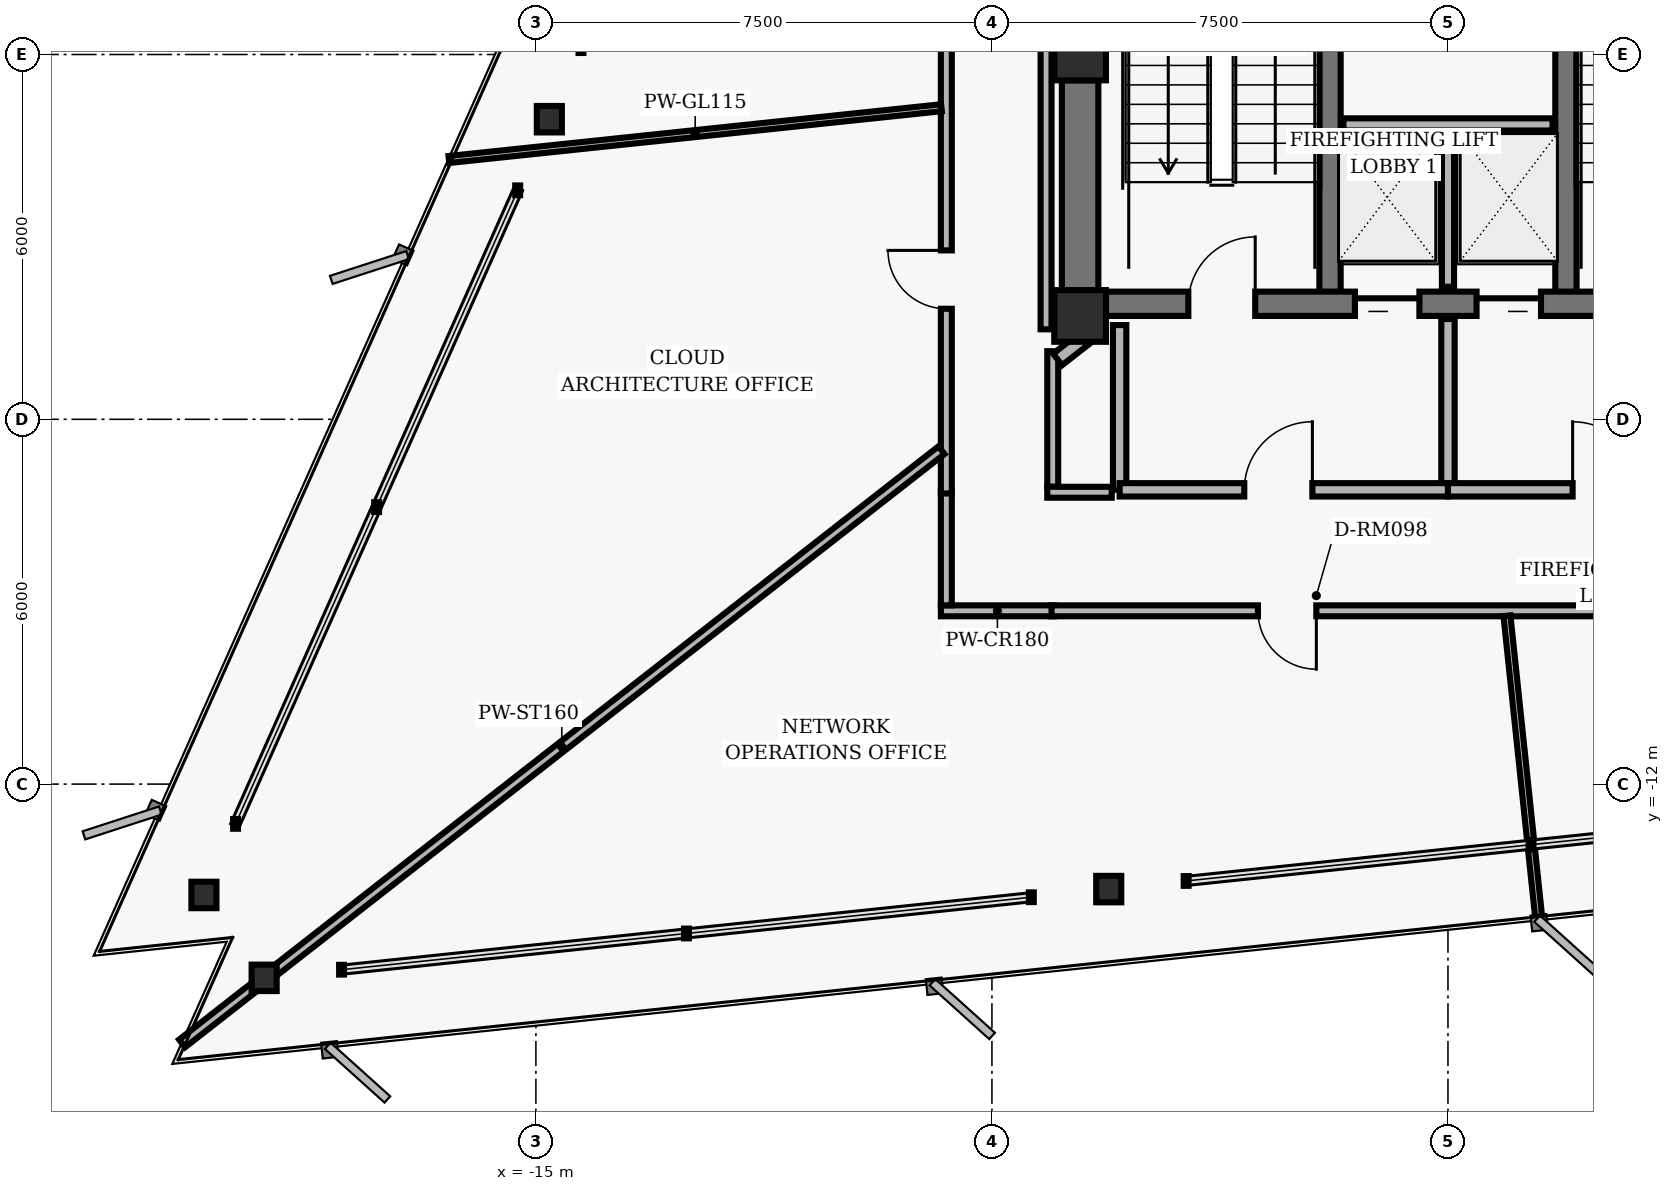
"""IFC4 building model, lengths in metres.
Left out: names, types, materials, properties, quantities, classifications, styles, units other than length and angle.
Written with IfcOpenShell. Run it as: python <this file> out.ifc"""

import sys

from ifc_helpers import new_model, si_unit, direction, frame, frame_2d, origin, origin_2d, place, context, subcontext, project, spatial, rectangle, hollow_rectangle, i_section, extrude, element, fill, save


model = new_model("IFC4")
c1 = context("Model", 3, precision=1e-05, world=origin(), true_north=direction((0.0, 1.0)))
c2 = subcontext(c1, "Body", "Model", "MODEL_VIEW")
j1 = project(units=[si_unit("LENGTHUNIT", "METRE"), si_unit("PLANEANGLEUNIT", "RADIAN")], contexts=[c1])
p1 = place(None, origin())
s1 = spatial("IfcSite", under=j1, at=p1, CompositionType="ELEMENT")
p2 = place(p1, origin())
s2 = spatial("IfcBuilding", under=s1, at=p2, CompositionType="ELEMENT")
p3 = place(p2, frame((0.0, 0.0, 104.64)))
s3 = spatial("IfcBuildingStorey", under=s2, at=p3, CompositionType="ELEMENT", Elevation=104.64)
for number, where, z_axis, x_axis in (
    (1, (-6.05, 0.0, 0.0), (0.0, 0.0, 1.0), (1.0, 0.0, 0.0)),
    (2, (-6.05, -4.3, 0.0), (0.0, 0.0, 1.0), (1.0, 0.0, 0.0)),
):
    element("IfcColumn", number, at=place(p3, frame(where, z_axis=z_axis, x_axis=x_axis)), inside=s3, PredefinedType="COLUMN", context=c2, shape_type="SweptSolid", body=[
        extrude(hollow_rectangle(XDim=0.85, YDim=0.85, WallThickness=0.055, InnerFilletRadius=0.02, OuterFilletRadius=0.04, at=origin_2d()), origin(), (0.0, 0.0, 1.0), 3.04),
    ])
p4 = place(p3, frame((-6.05, -3.875, 0.0), z_axis=(0.0, 0.0, 1.0), x_axis=(0.0, 1.0, 0.0)))
e3 = element("IfcWall", 3, at=p4, inside=s3, PredefinedType="SHEAR", context=c2, shape_type="SweptSolid", body=[
    extrude(rectangle(XDim=3.45, YDim=0.6, at=frame_2d((1.725, 0.0))), origin(), (0.0, 0.0, 1.0), 2.788),
])
for number, where, z_axis, x_axis in (
    (4, (-1.94, -4.1, 0.0), (0.0, 0.0, 1.0), (0.0, 1.0, 0.0)),
    (5, (1.94, -4.1, 0.0), (0.0, 0.0, 1.0), (0.0, 1.0, 0.0)),
):
    element("IfcWall", number, at=place(p3, frame(where, z_axis=z_axis, x_axis=x_axis)), inside=s3, PredefinedType="SHEAR", context=c2, shape_type="SweptSolid", body=[
        extrude(rectangle(XDim=8.2, YDim=0.35, at=frame_2d((4.1, 0.0))), origin(), (0.0, 0.0, 1.0), 2.788),
    ])
p5 = place(p3, frame((-5.625, -4.1, 0.0), z_axis=(0.0, 0.0, 1.0), x_axis=(1.0, 0.0, 0.0)))
e6 = element("IfcWall", 6, at=p5, inside=s3, PredefinedType="SHEAR", context=c2, shape_type="SweptSolid", body=[
    extrude(rectangle(XDim=11.25, YDim=0.4, at=frame_2d((5.625, 0.0))), origin(), (0.0, 0.0, 1.0), 2.788),
])
p6 = place(p5, frame((1.355, 0.0, 0.0)))
e7 = element("IfcOpeningElement", 7, at=p6, cuts=e6, PredefinedType="OPENING", context=c2, shape_type="SweptSolid", body=[
    extrude(rectangle(XDim=1.1, YDim=2.04, at=frame_2d((0.55, 1.02))), frame((0.0, 0.21, 0.0), z_axis=(0.0, -1.0, 0.0), x_axis=(1.0, 0.0, 0.0)), (0.0, 0.0, 1.0), 0.42),
])
p7 = place(p5, frame((8.795, 0.0, 0.0)))
e8 = element("IfcOpeningElement", 8, at=p7, cuts=e6, PredefinedType="OPENING", context=c2, shape_type="SweptSolid", body=[
    extrude(rectangle(XDim=1.1, YDim=2.04, at=frame_2d((0.55, 1.02))), frame((0.0, 0.21, 0.0), z_axis=(0.0, -1.0, 0.0), x_axis=(1.0, 0.0, 0.0)), (0.0, 0.0, 1.0), 0.42),
])
p8 = place(p5, frame((4.095, 0.0, 0.0)))
e9 = element("IfcOpeningElement", 9, at=p8, cuts=e6, PredefinedType="OPENING", context=c2, shape_type="SweptSolid", body=[
    extrude(rectangle(XDim=1.06, YDim=2.04, at=frame_2d((0.53, 1.02))), frame((0.0, 0.21, 0.0), z_axis=(0.0, -1.0, 0.0), x_axis=(1.0, 0.0, 0.0)), (0.0, 0.0, 1.0), 0.42),
])
p9 = place(p5, frame((6.095, 0.0, 0.0)))
e10 = element("IfcOpeningElement", 10, at=p9, cuts=e6, PredefinedType="OPENING", context=c2, shape_type="SweptSolid", body=[
    extrude(rectangle(XDim=1.06, YDim=2.04, at=frame_2d((0.53, 1.02))), frame((0.0, 0.21, 0.0), z_axis=(0.0, -1.0, 0.0), x_axis=(1.0, 0.0, 0.0)), (0.0, 0.0, 1.0), 0.42),
])
for number, where, z_axis, x_axis in (
    (11, (-14.779, -1.064, 0.0), (0.0, 0.0, 1.0), (1.0, 0.0, 0.0)),
    (12, (-20.46, -13.823, 0.0), (0.0, 0.0, 1.0), (1.0, 0.0, 0.0)),
    (13, (-19.469, -15.187, 0.0), (0.0, 0.0, 1.0), (1.0, 0.0, 0.0)),
    (14, (-5.579, -13.727, 0.0), (0.0, 0.0, 1.0), (1.0, 0.0, 0.0)),
):
    element("IfcColumn", number, at=place(p3, frame(where, z_axis=z_axis, x_axis=x_axis)), inside=s3, PredefinedType="COLUMN", context=c2, shape_type="SweptSolid", body=[
        extrude(i_section(OverallWidth=0.412, OverallDepth=0.435, WebThickness=0.036, FlangeThickness=0.057, FilletRadius=0.022, at=origin_2d()), origin(), (0.0, 0.0, 1.0), 3.04),
    ])
p10 = place(p3, frame((0.0, -3.82, 0.0), z_axis=(0.0, 0.0, 1.0), x_axis=(0.0, 1.0, 0.0)))
e15 = element("IfcWall", 15, at=p10, inside=s3, PredefinedType="PARTITIONING", context=c2, shape_type="SweptSolid", body=[
    extrude(rectangle(XDim=2.67, YDim=0.2, at=frame_2d((1.335, 0.0))), origin(), (0.0, 0.0, 1.0), 2.763),
])
p11 = place(p3, frame((-1.72, -1.15, 0.0), z_axis=(0.0, 0.0, 1.0), x_axis=(1.0, 0.0, 0.0)))
e16 = element("IfcWall", 16, at=p11, inside=s3, PredefinedType="PARTITIONING", context=c2, shape_type="SweptSolid", body=[
    extrude(rectangle(XDim=3.44, YDim=0.2, at=frame_2d((1.72, 0.0))), origin(), (0.0, 0.0, 1.0), 2.763),
])
p12 = place(p3, frame((-5.4, -7.16, 0.0), z_axis=(0.0, 0.0, 1.0), x_axis=(0.0, 1.0, 0.0)))
e17 = element("IfcWall", 17, at=p12, inside=s3, PredefinedType="PARTITIONING", context=c2, shape_type="SweptSolid", body=[
    extrude(rectangle(XDim=2.71, YDim=0.22, at=frame_2d((1.355, 0.0))), origin(), (0.0, 0.0, 1.0), 2.763),
])
p13 = place(p3, frame((0.0, -7.16, 0.0), z_axis=(0.0, 0.0, 1.0), x_axis=(0.0, 1.0, 0.0)))
e18 = element("IfcWall", 18, at=p13, inside=s3, PredefinedType="PARTITIONING", context=c2, shape_type="SweptSolid", body=[
    extrude(rectangle(XDim=2.81, YDim=0.22, at=frame_2d((1.405, 0.0))), origin(), (0.0, 0.0, 1.0), 2.763),
])
p14 = place(p3, frame((-5.4, -7.16, 0.0), z_axis=(0.0, 0.0, 1.0), x_axis=(1.0, 0.0, 0.0)))
e19 = element("IfcWall", 19, at=p14, inside=s3, PredefinedType="PARTITIONING", context=c2, shape_type="SweptSolid", body=[
    extrude(rectangle(XDim=5.4, YDim=0.22, at=frame_2d((2.7, 0.0))), origin(), (0.0, 0.0, 1.0), 2.33),
])
p15 = place(p14, frame((2.05, 0.0, 0.0)))
e20 = element("IfcOpeningElement", 20, at=p15, cuts=e19, PredefinedType="OPENING", context=c2, shape_type="SweptSolid", body=[
    extrude(rectangle(XDim=1.12, YDim=2.02, at=frame_2d((0.56, 1.01))), frame((0.0, 0.12, 0.0), z_axis=(0.0, -1.0, 0.0), x_axis=(1.0, 0.0, 0.0)), (0.0, 0.0, 1.0), 0.24),
])
p16 = place(p3, frame((0.0, -7.16, 0.0), z_axis=(0.0, 0.0, 1.0), x_axis=(1.0, 0.0, 0.0)))
e21 = element("IfcWall", 21, at=p16, inside=s3, PredefinedType="PARTITIONING", context=c2, shape_type="SweptSolid", body=[
    extrude(rectangle(XDim=5.4, YDim=0.22, at=frame_2d((2.7, 0.0))), origin(), (0.0, 0.0, 1.0), 2.33),
])
p17 = place(p16, frame((2.05, 0.0, 0.0)))
e22 = element("IfcOpeningElement", 22, at=p17, cuts=e21, PredefinedType="OPENING", context=c2, shape_type="SweptSolid", body=[
    extrude(rectangle(XDim=1.12, YDim=2.02, at=frame_2d((0.56, 1.01))), frame((0.0, 0.12, 0.0), z_axis=(0.0, -1.0, 0.0), x_axis=(1.0, 0.0, 0.0)), (0.0, 0.0, 1.0), 0.24),
])
p18 = place(p3, frame((-6.48, -9.15, 0.0), z_axis=(0.0, 0.0, 1.0), x_axis=(-1.0, 0.0, 0.0)))
e23 = element("IfcWall", 23, at=p18, inside=s3, PredefinedType="PARTITIONING", context=c2, shape_type="SweptSolid", body=[
    extrude(rectangle(XDim=1.86, YDim=0.18, at=frame_2d((0.93, 0.0))), origin(), (0.0, 0.0, 1.0), 2.33),
])
p19 = place(p3, frame((-8.25, -9.06, 0.0), z_axis=(0.0, 0.0, 1.0), x_axis=(0.0, 1.0, 0.0)))
e24 = element("IfcWall", 24, at=p19, inside=s3, PredefinedType="PARTITIONING", context=c2, shape_type="SweptSolid", body=[
    extrude(rectangle(XDim=1.88, YDim=0.18, at=frame_2d((0.94, 0.0))), origin(), (0.0, 0.0, 1.0), 2.763),
])
p20 = place(p3, frame((-8.25, -7.22, 0.0), z_axis=(0.0, 0.0, 1.0), x_axis=(0.0, 1.0, 0.0)))
e25 = element("IfcWall", 25, at=p20, inside=s3, PredefinedType="PARTITIONING", context=c2, shape_type="SweptSolid", body=[
    extrude(rectangle(XDim=14.44, YDim=0.18, at=frame_2d((7.22, 0.0))), origin(), (0.0, 0.0, 1.0), 2.33),
])
p21 = place(p20, frame((3.038, 0.0, 0.0)))
e26 = element("IfcOpeningElement", 26, at=p21, cuts=e25, PredefinedType="OPENING", context=c2, shape_type="SweptSolid", body=[
    extrude(rectangle(XDim=0.96, YDim=2.02, at=frame_2d((0.48, 1.01))), frame((0.0, 0.1, 0.0), z_axis=(0.0, -1.0, 0.0), x_axis=(1.0, 0.0, 0.0)), (0.0, 0.0, 1.0), 0.2),
])
p22 = place(p20, frame((9.456, 0.0, 0.0)))
e27 = element("IfcOpeningElement", 27, at=p22, cuts=e25, PredefinedType="OPENING", context=c2, shape_type="SweptSolid", body=[
    extrude(rectangle(XDim=1.18, YDim=2.02, at=frame_2d((0.59, 1.01))), frame((0.0, 0.1, 0.0), z_axis=(0.0, -1.0, 0.0), x_axis=(1.0, 0.0, 0.0)), (0.0, 0.0, 1.0), 0.2),
])
p23 = place(p3, frame((10.98, -9.15, 0.0), z_axis=(0.0, 0.0, 1.0), x_axis=(-1.0, 0.0, 0.0)))
e28 = element("IfcWall", 28, at=p23, inside=s3, PredefinedType="PARTITIONING", context=c2, shape_type="SweptSolid", body=[
    extrude(rectangle(XDim=17.5, YDim=0.18, at=frame_2d((8.75, 0.0))), origin(), (0.0, 0.0, 1.0), 2.33),
])
p24 = place(p23, frame((13.145, 0.0, 0.0)))
e29 = element("IfcOpeningElement", 29, at=p24, cuts=e28, PredefinedType="OPENING", context=c2, shape_type="SweptSolid", body=[
    extrude(rectangle(XDim=0.96, YDim=2.02, at=frame_2d((0.48, 1.01))), frame((0.0, 0.1, 0.0), z_axis=(0.0, -1.0, 0.0), x_axis=(1.0, 0.0, 0.0)), (0.0, 0.0, 1.0), 0.2),
])
p25 = place(p23, frame((4.655, 0.0, 0.0)))
e30 = element("IfcOpeningElement", 30, at=p25, cuts=e28, PredefinedType="OPENING", context=c2, shape_type="SweptSolid", body=[
    extrude(rectangle(XDim=0.96, YDim=2.02, at=frame_2d((0.48, 1.01))), frame((0.0, 0.1, 0.0), z_axis=(0.0, -1.0, 0.0), x_axis=(1.0, 0.0, 0.0)), (0.0, 0.0, 1.0), 0.2),
])
p26 = place(p3, frame((-6.61, 4.94, 0.0), z_axis=(0.0, 0.0, 1.0), x_axis=(0.0, -1.0, 0.0)))
e31 = element("IfcWall", 31, at=p26, inside=s3, PredefinedType="PARTITIONING", context=c2, shape_type="SweptSolid", body=[
    extrude(rectangle(XDim=9.46, YDim=0.18, at=frame_2d((4.73, 0.0))), origin(), (0.0, 0.0, 1.0), 2.763),
])
p27 = place(p3, frame((-6.5, -4.88, 0.0), z_axis=(0.0, 0.0, 1.0), x_axis=(0.0, -1.0, 0.0)))
e32 = element("IfcWall", 32, at=p27, inside=s3, PredefinedType="PARTITIONING", context=c2, shape_type="SweptSolid", body=[
    extrude(rectangle(XDim=2.23, YDim=0.18, at=frame_2d((1.115, 0.0))), origin(), (0.0, 0.0, 1.0), 2.763),
])
p28 = place(p3, frame((-6.59, -7.2, 0.0), z_axis=(0.0, 0.0, 1.0), x_axis=(1.0, 0.0, 0.0)))
e33 = element("IfcWall", 33, at=p28, inside=s3, PredefinedType="PARTITIONING", context=c2, shape_type="SweptSolid", body=[
    extrude(rectangle(XDim=1.06, YDim=0.18, at=frame_2d((0.53, 0.0))), origin(), (0.0, 0.0, 1.0), 2.33),
])
p29 = place(p3, frame((-8.33, -0.875, 0.0), z_axis=(0.0, 0.0, 1.0), x_axis=(-0.994520879121, -0.104538131765, 0.0)))
e34 = element("IfcWall", 34, at=p29, inside=s3, PredefinedType="MOVABLE", context=c2, shape_type="SweptSolid", body=[
    extrude(rectangle(XDim=8.146, YDim=0.115, at=frame_2d((4.073, 0.0))), origin(), (0.0, 0.0, 1.0), 2.763),
])
p30 = place(p3, frame((-5.836, -4.56, 0.0), z_axis=(0.0, 0.0, 1.0), x_axis=(-0.788054366409, -0.615605649408, 0.0)))
e35 = element("IfcWall", 35, at=p30, inside=s3, PredefinedType="PARTITIONING", context=c2, shape_type="SweptSolid", body=[
    extrude(rectangle(XDim=0.74, YDim=0.24, at=frame_2d((0.37, 0.0))), origin(), (0.0, 0.0, 1.0), 2.132),
])
p31 = place(p3, frame((-8.33, -6.508, 0.0), z_axis=(0.0, 0.0, 1.0), x_axis=(-0.788011528275, -0.615660483794, 0.0)))
e36 = element("IfcWall", 36, at=p31, inside=s3, PredefinedType="PARTITIONING", context=c2, shape_type="SweptSolid", body=[
    extrude(rectangle(XDim=15.848, YDim=0.16, at=frame_2d((7.924, 0.0))), origin(), (0.0, 0.0, 1.0), 2.132),
])
p32 = place(p3, frame((0.97, -9.23, 0.0), z_axis=(0.0, 0.0, 1.0), x_axis=(0.104502779655, -0.994524594489, 0.0)))
e37 = element("IfcWall", 37, at=p32, inside=s3, PredefinedType="MOVABLE", context=c2, shape_type="SweptSolid", body=[
    extrude(rectangle(XDim=5.028, YDim=0.115, at=frame_2d((2.514, 0.0))), origin(), (0.0, 0.0, 1.0), 2.763),
])
p33 = place(p6, origin())
e38 = element("IfcDoor", 38, at=p33, inside=s3, OperationType="SINGLE_SWING_RIGHT", PredefinedType="DOOR", context=c2, shape_type="SweptSolid", body=[
    extrude(rectangle(XDim=1.1, YDim=2.04, at=frame_2d((0.55, 1.02))), frame((0.0, 0.025, 0.0), z_axis=(0.0, -1.0, 0.0), x_axis=(1.0, 0.0, 0.0)), (0.0, 0.0, 1.0), 0.05),
])
fill(e7, e38)
p34 = place(p8, origin())
e39 = element("IfcDoor", 39, at=p34, inside=s3, OperationType="SLIDING_TO_LEFT", PredefinedType="DOOR", context=c2, shape_type="SweptSolid", body=[
    extrude(rectangle(XDim=1.06, YDim=2.04, at=frame_2d((0.53, 1.02))), frame((0.0, 0.025, 0.0), z_axis=(0.0, -1.0, 0.0), x_axis=(1.0, 0.0, 0.0)), (0.0, 0.0, 1.0), 0.05),
])
fill(e9, e39)
p35 = place(p9, origin())
e40 = element("IfcDoor", 40, at=p35, inside=s3, OperationType="SLIDING_TO_RIGHT", PredefinedType="DOOR", context=c2, shape_type="SweptSolid", body=[
    extrude(rectangle(XDim=1.06, YDim=2.04, at=frame_2d((0.53, 1.02))), frame((0.0, 0.025, 0.0), z_axis=(0.0, -1.0, 0.0), x_axis=(1.0, 0.0, 0.0)), (0.0, 0.0, 1.0), 0.05),
])
fill(e10, e40)
p36 = place(p15, origin())
e41 = element("IfcDoor", 41, at=p36, inside=s3, OperationType="SINGLE_SWING_RIGHT", PredefinedType="DOOR", context=c2, shape_type="SweptSolid", body=[
    extrude(rectangle(XDim=1.12, YDim=2.02, at=frame_2d((0.56, 1.01))), frame((0.0, 0.025, 0.0), z_axis=(0.0, -1.0, 0.0), x_axis=(1.0, 0.0, 0.0)), (0.0, 0.0, 1.0), 0.05),
])
fill(e20, e41)
p37 = place(p17, origin())
e42 = element("IfcDoor", 42, at=p37, inside=s3, OperationType="SINGLE_SWING_LEFT", PredefinedType="DOOR", context=c2, shape_type="SweptSolid", body=[
    extrude(rectangle(XDim=1.12, YDim=2.02, at=frame_2d((0.56, 1.01))), frame((0.0, 0.025, 0.0), z_axis=(0.0, -1.0, 0.0), x_axis=(1.0, 0.0, 0.0)), (0.0, 0.0, 1.0), 0.05),
])
fill(e22, e42)
p38 = place(p21, origin())
e43 = element("IfcDoor", 43, at=p38, inside=s3, OperationType="SINGLE_SWING_RIGHT", PredefinedType="DOOR", context=c2, shape_type="SweptSolid", body=[
    extrude(rectangle(XDim=0.96, YDim=2.02, at=frame_2d((0.48, 1.01))), frame((0.0, 0.025, 0.0), z_axis=(0.0, -1.0, 0.0), x_axis=(1.0, 0.0, 0.0)), (0.0, 0.0, 1.0), 0.05),
])
fill(e26, e43)
p39 = place(p24, origin())
e44 = element("IfcDoor", 44, at=p39, inside=s3, OperationType="SINGLE_SWING_LEFT", PredefinedType="DOOR", context=c2, shape_type="SweptSolid", body=[
    extrude(rectangle(XDim=0.96, YDim=2.02, at=frame_2d((0.48, 1.01))), frame((0.0, 0.025, 0.0), z_axis=(0.0, -1.0, 0.0), x_axis=(1.0, 0.0, 0.0)), (0.0, 0.0, 1.0), 0.05),
])
fill(e29, e44)
save(model, sys.argv[1])
